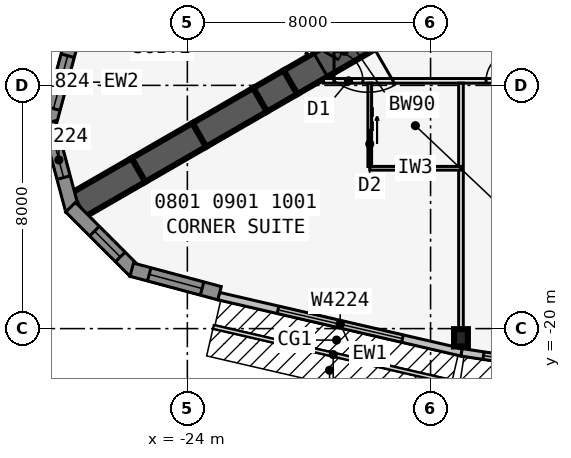
"""IFC4 building model, lengths in metres.
Left out: names, types, materials, properties, quantities, classifications, styles, units other than length and angle.
Written with IfcOpenShell. Run it as: python <this file> out.ifc"""

import sys

from ifc_helpers import new_model, si_unit, direction, frame, frame_2d, origin, origin_2d, place, context, subcontext, project, spatial, polyline, rectangle, i_section, outline, extrude, element, fill, save


model = new_model("IFC4")
c1 = context("Model", 3, precision=1e-05, world=origin(), true_north=direction((0.0, 1.0)))
c2 = subcontext(c1, "Body", "Model", "MODEL_VIEW")
j1 = project(units=[si_unit("LENGTHUNIT", "METRE"), si_unit("PLANEANGLEUNIT", "RADIAN")], contexts=[c1])
p1 = place(None, origin())
s1 = spatial("IfcSite", under=j1, at=p1, CompositionType="ELEMENT")
p2 = place(p1, origin())
s2 = spatial("IfcBuilding", under=s1, at=p2, CompositionType="ELEMENT")
p3 = place(p2, frame((0.0, 0.0, 38.7)))
s3 = spatial("IfcBuildingStorey", under=s2, at=p3, CompositionType="ELEMENT", Elevation=38.7)
p4 = place(p3, frame((-16.5, -9.526, 0.0), z_axis=(0.0, 0.0, 1.0), x_axis=(-0.866031398331, -0.499989616998, 0.0)))
e1 = element("IfcWall", 1, at=p4, inside=s3, PredefinedType="SHEAR", context=c2, shape_type="SweptSolid", body=[
    extrude(rectangle(XDim=4.746, YDim=0.9, at=frame_2d((2.373, 0.0))), origin(), (0.0, 0.0, 1.0), 3.4),
])
p5 = place(p4, frame((1.8, 0.0, 0.0)))
e2 = element("IfcOpeningElement", 2, at=p5, cuts=e1, PredefinedType="OPENING", context=c2, shape_type="SweptSolid", body=[
    extrude(rectangle(XDim=1.8, YDim=2.13, at=frame_2d((0.9, 1.065))), frame((0.0, 0.46, 0.0), z_axis=(0.0, -1.0, 0.0), x_axis=(1.0, 0.0, 0.0)), (0.0, 0.0, 1.0), 0.92),
])
p6 = place(p3, frame((-20.61, -11.899, 0.0), z_axis=(0.0, 0.0, 1.0), x_axis=(-0.866009537788, -0.500027479704, 0.0)))
e3 = element("IfcWall", 3, at=p6, inside=s3, PredefinedType="SHEAR", context=c2, shape_type="SweptSolid", body=[
    extrude(rectangle(XDim=1.155, YDim=0.9, at=frame_2d((0.577, 0.0))), origin(), (0.0, 0.0, 1.0), 3.4),
])
for number, where, z_axis, x_axis in (
    (4, (-21.61, -12.477, 0.0), (0.0, 0.0, 1.0), (-0.866, -0.5, 0.0)),
    (5, (-23.61, -13.631, 0.0), (0.0, 0.0, 1.0), (-0.866, -0.5, 0.0)),
    (6, (-25.61, -14.786, 0.0), (0.0, 0.0, 1.0), (-0.866, -0.5, 0.0)),
):
    element("IfcWall", number, at=place(p3, frame(where, z_axis=z_axis, x_axis=x_axis)), inside=s3, PredefinedType="SHEAR", context=c2, shape_type="SweptSolid", body=[
        extrude(rectangle(XDim=2.309, YDim=0.9, at=frame_2d((1.155, 0.0))), origin(), (0.0, 0.0, 1.0), 3.4),
    ])
p7 = place(p3, frame((-15.0, -20.303, 0.0), z_axis=(0.0, 0.0, 1.0), x_axis=(1.0, 0.0, 0.0)))
e7 = element("IfcColumn", 7, at=p7, inside=s3, PredefinedType="COLUMN", context=c2, shape_type="SweptSolid", body=[
    extrude(i_section(OverallWidth=0.455, OverallDepth=0.569, WebThickness=0.078, FlangeThickness=0.125, at=origin_2d()), origin(), (0.0, 0.0, 1.0), 3.4),
])
p8 = place(p3, frame((-22.972, -18.931, 0.0), z_axis=(0.0, 0.0, 1.0), x_axis=(0.974279327392, -0.225343720163, 0.0)))
e8 = element("IfcWall", 8, at=p8, inside=s3, PredefinedType="STANDARD", context=c2, shape_type="SweptSolid", body=[
    extrude(rectangle(XDim=8.211, YDim=0.25, at=frame_2d((4.105, 0.0))), origin(), (0.0, 0.0, 1.0), 3.235),
])
p9 = place(p8, frame((2.006, 0.0, 0.45)))
e9 = element("IfcOpeningElement", 9, at=p9, cuts=e8, PredefinedType="OPENING", context=c2, shape_type="SweptSolid", body=[
    extrude(rectangle(XDim=4.2, YDim=2.4, at=frame_2d((2.1, 1.2))), frame((0.0, 0.135, 0.0), z_axis=(0.0, -1.0, 0.0), x_axis=(1.0, 0.0, 0.0)), (0.0, 0.0, 1.0), 0.27),
])
p10 = place(p3, frame((-14.981, -20.779, 0.0), z_axis=(0.0, 0.0, 1.0), x_axis=(0.988615403399, -0.150464561152, 0.0)))
e10 = element("IfcWall", 10, at=p10, inside=s3, PredefinedType="STANDARD", context=c2, shape_type="SweptSolid", body=[
    extrude(rectangle(XDim=5.058, YDim=0.25, at=frame_2d((2.529, 0.0))), origin(), (0.0, 0.0, 1.0), 3.235),
])
p11 = place(p10, frame((0.729, 0.0, 0.45)))
e11 = element("IfcOpeningElement", 11, at=p11, cuts=e10, PredefinedType="OPENING", context=c2, shape_type="SweptSolid", body=[
    extrude(rectangle(XDim=3.6, YDim=2.4, at=frame_2d((1.8, 1.2))), frame((0.0, 0.135, 0.0), z_axis=(0.0, -1.0, 0.0), x_axis=(1.0, 0.0, 0.0)), (0.0, 0.0, 1.0), 0.27),
])
p12 = place(p3, frame((-27.783, -10.45, 0.0), z_axis=(0.0, 0.0, 1.0), x_axis=(-0.258780998834, -0.965936019953, 0.0)))
e12 = element("IfcWall", 12, at=p12, inside=s3, PredefinedType="SOLIDWALL", context=c2, shape_type="SweptSolid", body=[
    extrude(rectangle(XDim=2.989, YDim=0.45, at=frame_2d((1.494, 0.0))), origin(), (0.0, 0.0, 1.0), 3.235),
])
p13 = place(p12, frame((0.594, 0.0, 0.45)))
e13 = element("IfcOpeningElement", 13, at=p13, cuts=e12, PredefinedType="OPENING", context=c2, shape_type="SweptSolid", body=[
    extrude(rectangle(XDim=1.8, YDim=2.4, at=frame_2d((0.9, 1.2))), frame((0.0, 0.235, 0.0), z_axis=(0.0, -1.0, 0.0), x_axis=(1.0, 0.0, 0.0)), (0.0, 0.0, 1.0), 0.47),
])
p14 = place(p3, frame((-28.556, -13.221, 0.0), z_axis=(0.0, 0.0, 1.0), x_axis=(0.258801419081, -0.965930548995, 0.0)))
e14 = element("IfcWall", 14, at=p14, inside=s3, PredefinedType="SOLIDWALL", context=c2, shape_type="SweptSolid", body=[
    extrude(outline(polyline([(2.989, 0.225), (2.929, 0.225), (2.437, 0.093), (2.402, 0.225), (0.0, 0.225), (0.0, -0.225), (2.989, -0.225), (2.989, 0.225)])), origin(), (0.0, 0.0, 1.0), 3.235),
])
p15 = place(p14, frame((0.676, 0.0, 0.45)))
e15 = element("IfcOpeningElement", 15, at=p15, cuts=e14, PredefinedType="OPENING", context=c2, shape_type="SweptSolid", body=[
    extrude(rectangle(XDim=1.2, YDim=2.4, at=frame_2d((0.6, 1.2))), frame((0.0, 0.235, 0.0), z_axis=(0.0, -1.0, 0.0), x_axis=(1.0, 0.0, 0.0)), (0.0, 0.0, 1.0), 0.47),
])
p16 = place(p3, frame((-27.841, -16.007, 0.0), z_axis=(0.0, 0.0, 1.0), x_axis=(0.707025086683, -0.707188466253, 0.0)))
e16 = element("IfcWall", 16, at=p16, inside=s3, PredefinedType="SOLIDWALL", context=c2, shape_type="SweptSolid", body=[
    extrude(outline(polyline([(2.989, 0.225), (0.586, 0.225), (0.551, 0.093), (0.059, 0.225), (0.0, 0.225), (0.0, -0.225), (2.989, -0.225), (2.989, 0.225)])), origin(), (0.0, 0.0, 1.0), 3.235),
])
p17 = place(p16, frame((1.113, 0.0, 0.45)))
e17 = element("IfcOpeningElement", 17, at=p17, cuts=e16, PredefinedType="OPENING", context=c2, shape_type="SweptSolid", body=[
    extrude(rectangle(XDim=1.2, YDim=2.4, at=frame_2d((0.6, 1.2))), frame((0.0, 0.235, 0.0), z_axis=(0.0, -1.0, 0.0), x_axis=(1.0, 0.0, 0.0)), (0.0, 0.0, 1.0), 0.47),
])
p18 = place(p3, frame((-25.829, -18.062, 0.0), z_axis=(0.0, 0.0, 1.0), x_axis=(0.965930548995, -0.258801419081, 0.0)))
e18 = element("IfcWall", 18, at=p18, inside=s3, PredefinedType="SOLIDWALL", context=c2, shape_type="SweptSolid", body=[
    extrude(rectangle(XDim=2.989, YDim=0.45, at=frame_2d((1.494, 0.0))), origin(), (0.0, 0.0, 1.0), 3.235),
])
p19 = place(p18, frame((0.594, 0.0, 0.45)))
e19 = element("IfcOpeningElement", 19, at=p19, cuts=e18, PredefinedType="OPENING", context=c2, shape_type="SweptSolid", body=[
    extrude(rectangle(XDim=1.8, YDim=2.4, at=frame_2d((0.9, 1.2))), frame((0.0, 0.235, 0.0), z_axis=(0.0, -1.0, 0.0), x_axis=(1.0, 0.0, 0.0)), (0.0, 0.0, 1.0), 0.47),
])
p20 = place(p3, frame((-19.527, -11.851, 0.0), z_axis=(0.0, 0.0, 1.0), x_axis=(1.0, 0.0, 0.0)))
e20 = element("IfcWall", 20, at=p20, inside=s3, PredefinedType="PARTITIONING", context=c2, shape_type="SweptSolid", body=[
    extrude(rectangle(XDim=39.054, YDim=0.15, at=frame_2d((19.527, 0.0))), origin(), (0.0, 0.0, 1.0), 3.235),
])
p21 = place(p20, frame((0.352, 0.0, 0.0)))
e21 = element("IfcOpeningElement", 21, at=p21, cuts=e20, PredefinedType="OPENING", context=c2, shape_type="SweptSolid", body=[
    extrude(rectangle(XDim=0.95, YDim=2.13, at=frame_2d((0.475, 1.065))), frame((0.0, 0.085, 0.0), z_axis=(0.0, -1.0, 0.0), x_axis=(1.0, 0.0, 0.0)), (0.0, 0.0, 1.0), 0.17),
])
p22 = place(p20, frame((5.352, 0.0, 0.0)))
e22 = element("IfcOpeningElement", 22, at=p22, cuts=e20, PredefinedType="OPENING", context=c2, shape_type="SweptSolid", body=[
    extrude(rectangle(XDim=0.95, YDim=2.13, at=frame_2d((0.475, 1.065))), frame((0.0, 0.085, 0.0), z_axis=(0.0, -1.0, 0.0), x_axis=(1.0, 0.0, 0.0)), (0.0, 0.0, 1.0), 0.17),
])
p23 = place(p20, frame((12.752, 0.0, 0.0)))
e23 = element("IfcOpeningElement", 23, at=p23, cuts=e20, PredefinedType="OPENING", context=c2, shape_type="SweptSolid", body=[
    extrude(rectangle(XDim=0.95, YDim=2.13, at=frame_2d((0.475, 1.065))), frame((0.0, 0.085, 0.0), z_axis=(0.0, -1.0, 0.0), x_axis=(1.0, 0.0, 0.0)), (0.0, 0.0, 1.0), 0.17),
])
p24 = place(p20, frame((21.527, 0.0, 0.0)))
e24 = element("IfcOpeningElement", 24, at=p24, cuts=e20, PredefinedType="OPENING", context=c2, shape_type="SweptSolid", body=[
    extrude(rectangle(XDim=1.0, YDim=2.13, at=frame_2d((0.5, 1.065))), frame((0.0, 0.085, 0.0), z_axis=(0.0, -1.0, 0.0), x_axis=(1.0, 0.0, 0.0)), (0.0, 0.0, 1.0), 0.17),
])
p25 = place(p20, frame((25.952, 0.0, 0.0)))
e25 = element("IfcOpeningElement", 25, at=p25, cuts=e20, PredefinedType="OPENING", context=c2, shape_type="SweptSolid", body=[
    extrude(rectangle(XDim=0.95, YDim=2.13, at=frame_2d((0.475, 1.065))), frame((0.0, 0.085, 0.0), z_axis=(0.0, -1.0, 0.0), x_axis=(1.0, 0.0, 0.0)), (0.0, 0.0, 1.0), 0.17),
])
p26 = place(p20, frame((36.546, 0.0, 0.0)))
e26 = element("IfcOpeningElement", 26, at=p26, cuts=e20, PredefinedType="OPENING", context=c2, shape_type="SweptSolid", body=[
    extrude(rectangle(XDim=0.95, YDim=2.13, at=frame_2d((0.475, 1.065))), frame((0.0, 0.085, 0.0), z_axis=(0.0, -1.0, 0.0), x_axis=(1.0, 0.0, 0.0)), (0.0, 0.0, 1.0), 0.17),
])
p27 = place(p3, frame((-15.0, -11.926, 0.0), z_axis=(0.0, 0.0, 1.0), x_axis=(0.0, -1.0, 0.0)))
e27 = element("IfcWall", 27, at=p27, inside=s3, PredefinedType="PARTITIONING", context=c2, shape_type="SweptSolid", body=[
    extrude(rectangle(XDim=8.72, YDim=0.15, at=frame_2d((4.36, 0.0))), origin(), (0.0, 0.0, 1.0), 2.389),
])
p28 = place(p3, frame((-18.0, -14.726, 0.0), z_axis=(0.0, 0.0, 1.0), x_axis=(1.0, 0.0, 0.0)))
e28 = element("IfcWall", 28, at=p28, inside=s3, PredefinedType="PLUMBINGWALL", context=c2, shape_type="SweptSolid", body=[
    extrude(rectangle(XDim=3.0, YDim=0.12, at=frame_2d((1.5, 0.0))), origin(), (0.0, 0.0, 1.0), 3.235),
])
p29 = place(p3, frame((-18.0, -11.926, 0.0), z_axis=(0.0, 0.0, 1.0), x_axis=(0.0, -1.0, 0.0)))
e29 = element("IfcWall", 29, at=p29, inside=s3, PredefinedType="PLUMBINGWALL", context=c2, shape_type="SweptSolid", body=[
    extrude(rectangle(XDim=2.74, YDim=0.12, at=frame_2d((1.37, 0.0))), origin(), (0.0, 0.0, 1.0), 3.235),
])
p30 = place(p29, frame((1.55, 0.0, 0.0)))
e30 = element("IfcOpeningElement", 30, at=p30, cuts=e29, PredefinedType="OPENING", context=c2, shape_type="SweptSolid", body=[
    extrude(rectangle(XDim=0.9, YDim=2.13, at=frame_2d((0.45, 1.065))), frame((0.0, 0.07, 0.0), z_axis=(0.0, -1.0, 0.0), x_axis=(1.0, 0.0, 0.0)), (0.0, 0.0, 1.0), 0.14),
])
p31 = place(p3, frame((-0.5, 22.836, 0.0), z_axis=(0.0, 0.0, 1.0), x_axis=(-0.500001677587, -0.866024435227, 0.0)))
e31 = element("IfcWall", 31, at=p31, inside=s3, PredefinedType="PARTITIONING", context=c2, shape_type="SweptSolid", body=[
    extrude(rectangle(XDim=39.054, YDim=0.15, at=frame_2d((19.527, 0.0))), origin(), (0.0, 0.0, 1.0), 3.235),
])
p32 = place(p31, frame((0.352, 0.0, 0.0)))
e32 = element("IfcOpeningElement", 32, at=p32, cuts=e31, PredefinedType="OPENING", context=c2, shape_type="SweptSolid", body=[
    extrude(rectangle(XDim=0.95, YDim=2.13, at=frame_2d((0.475, 1.065))), frame((0.0, 0.085, 0.0), z_axis=(0.0, -1.0, 0.0), x_axis=(1.0, 0.0, 0.0)), (0.0, 0.0, 1.0), 0.17),
])
p33 = place(p31, frame((5.952, 0.0, 0.0)))
e33 = element("IfcOpeningElement", 33, at=p33, cuts=e31, PredefinedType="OPENING", context=c2, shape_type="SweptSolid", body=[
    extrude(rectangle(XDim=0.95, YDim=2.13, at=frame_2d((0.475, 1.065))), frame((0.0, 0.085, 0.0), z_axis=(0.0, -1.0, 0.0), x_axis=(1.0, 0.0, 0.0)), (0.0, 0.0, 1.0), 0.17),
])
p34 = place(p31, frame((11.552, 0.0, 0.0)))
e34 = element("IfcOpeningElement", 34, at=p34, cuts=e31, PredefinedType="OPENING", context=c2, shape_type="SweptSolid", body=[
    extrude(rectangle(XDim=0.95, YDim=2.13, at=frame_2d((0.475, 1.065))), frame((0.0, 0.085, 0.0), z_axis=(0.0, -1.0, 0.0), x_axis=(1.0, 0.0, 0.0)), (0.0, 0.0, 1.0), 0.17),
])
p35 = place(p31, frame((21.552, 0.0, 0.0)))
e35 = element("IfcOpeningElement", 35, at=p35, cuts=e31, PredefinedType="OPENING", context=c2, shape_type="SweptSolid", body=[
    extrude(rectangle(XDim=0.95, YDim=2.13, at=frame_2d((0.475, 1.065))), frame((0.0, 0.085, 0.0), z_axis=(0.0, -1.0, 0.0), x_axis=(1.0, 0.0, 0.0)), (0.0, 0.0, 1.0), 0.17),
])
p36 = place(p31, frame((30.952, 0.0, 0.0)))
e36 = element("IfcOpeningElement", 36, at=p36, cuts=e31, PredefinedType="OPENING", context=c2, shape_type="SweptSolid", body=[
    extrude(rectangle(XDim=0.95, YDim=2.13, at=frame_2d((0.475, 1.065))), frame((0.0, 0.085, 0.0), z_axis=(0.0, -1.0, 0.0), x_axis=(1.0, 0.0, 0.0)), (0.0, 0.0, 1.0), 0.17),
])
p37 = place(p31, frame((37.752, 0.0, 0.0)))
e37 = element("IfcOpeningElement", 37, at=p37, cuts=e31, PredefinedType="OPENING", context=c2, shape_type="SweptSolid", body=[
    extrude(rectangle(XDim=0.95, YDim=2.13, at=frame_2d((0.475, 1.065))), frame((0.0, 0.085, 0.0), z_axis=(0.0, -1.0, 0.0), x_axis=(1.0, 0.0, 0.0)), (0.0, 0.0, 1.0), 0.17),
])
p38 = place(p9, origin())
e38 = element("IfcWindow", 38, at=p38, inside=s3, PartitioningType="SINGLE_PANEL", PredefinedType="WINDOW", context=c2, shape_type="SweptSolid", body=[
    extrude(rectangle(XDim=4.2, YDim=2.4, at=frame_2d((2.1, 1.2))), frame((0.0, 0.03, 0.0), z_axis=(0.0, -1.0, 0.0), x_axis=(1.0, 0.0, 0.0)), (0.0, 0.0, 1.0), 0.06),
])
fill(e9, e38)
p39 = place(p11, origin())
e39 = element("IfcWindow", 39, at=p39, inside=s3, PartitioningType="SINGLE_PANEL", PredefinedType="WINDOW", context=c2, shape_type="SweptSolid", body=[
    extrude(rectangle(XDim=3.6, YDim=2.4, at=frame_2d((1.8, 1.2))), frame((0.0, 0.03, 0.0), z_axis=(0.0, -1.0, 0.0), x_axis=(1.0, 0.0, 0.0)), (0.0, 0.0, 1.0), 0.06),
])
fill(e11, e39)
p40 = place(p13, origin())
e40 = element("IfcWindow", 40, at=p40, inside=s3, PartitioningType="SINGLE_PANEL", PredefinedType="WINDOW", context=c2, shape_type="SweptSolid", body=[
    extrude(rectangle(XDim=1.8, YDim=2.4, at=frame_2d((0.9, 1.2))), frame((0.0, 0.03, 0.0), z_axis=(0.0, -1.0, 0.0), x_axis=(1.0, 0.0, 0.0)), (0.0, 0.0, 1.0), 0.06),
])
fill(e13, e40)
p41 = place(p15, origin())
e41 = element("IfcWindow", 41, at=p41, inside=s3, PartitioningType="SINGLE_PANEL", PredefinedType="WINDOW", context=c2, shape_type="SweptSolid", body=[
    extrude(rectangle(XDim=1.2, YDim=2.4, at=frame_2d((0.6, 1.2))), frame((0.0, 0.03, 0.0), z_axis=(0.0, -1.0, 0.0), x_axis=(1.0, 0.0, 0.0)), (0.0, 0.0, 1.0), 0.06),
])
fill(e15, e41)
p42 = place(p17, origin())
e42 = element("IfcWindow", 42, at=p42, inside=s3, PartitioningType="SINGLE_PANEL", PredefinedType="WINDOW", context=c2, shape_type="SweptSolid", body=[
    extrude(rectangle(XDim=1.2, YDim=2.4, at=frame_2d((0.6, 1.2))), frame((0.0, 0.03, 0.0), z_axis=(0.0, -1.0, 0.0), x_axis=(1.0, 0.0, 0.0)), (0.0, 0.0, 1.0), 0.06),
])
fill(e17, e42)
p43 = place(p19, origin())
e43 = element("IfcWindow", 43, at=p43, inside=s3, PartitioningType="SINGLE_PANEL", PredefinedType="WINDOW", context=c2, shape_type="SweptSolid", body=[
    extrude(rectangle(XDim=1.8, YDim=2.4, at=frame_2d((0.9, 1.2))), frame((0.0, 0.03, 0.0), z_axis=(0.0, -1.0, 0.0), x_axis=(1.0, 0.0, 0.0)), (0.0, 0.0, 1.0), 0.06),
])
fill(e19, e43)
p44 = place(p30, origin())
e44 = element("IfcDoor", 44, at=p44, inside=s3, OperationType="SLIDING_TO_LEFT", PredefinedType="DOOR", context=c2, shape_type="SweptSolid", body=[
    extrude(rectangle(XDim=0.9, YDim=2.13, at=frame_2d((0.45, 1.065))), frame((0.0, 0.025, 0.0), z_axis=(0.0, -1.0, 0.0), x_axis=(1.0, 0.0, 0.0)), (0.0, 0.0, 1.0), 0.05),
])
fill(e30, e44)
p45 = place(p21, origin())
e45 = element("IfcDoor", 45, at=p45, inside=s3, OperationType="SINGLE_SWING_LEFT", PredefinedType="DOOR", context=c2, shape_type="SweptSolid", body=[
    extrude(rectangle(XDim=0.95, YDim=2.13, at=frame_2d((0.475, 1.065))), frame((0.0, 0.025, 0.0), z_axis=(0.0, -1.0, 0.0), x_axis=(1.0, 0.0, 0.0)), (0.0, 0.0, 1.0), 0.05),
])
fill(e21, e45)
p46 = place(p22, origin())
e46 = element("IfcDoor", 46, at=p46, inside=s3, OperationType="SINGLE_SWING_RIGHT", PredefinedType="DOOR", context=c2, shape_type="SweptSolid", body=[
    extrude(rectangle(XDim=0.95, YDim=2.13, at=frame_2d((0.475, 1.065))), frame((0.0, 0.025, 0.0), z_axis=(0.0, -1.0, 0.0), x_axis=(1.0, 0.0, 0.0)), (0.0, 0.0, 1.0), 0.05),
])
fill(e22, e46)
p47 = place(p5, origin())
e47 = element("IfcDoor", 47, at=p47, inside=s3, OperationType="DOUBLE_DOOR_DOUBLE_SWING", PredefinedType="DOOR", context=c2, shape_type="SweptSolid", body=[
    extrude(rectangle(XDim=1.8, YDim=2.13, at=frame_2d((0.9, 1.065))), frame((0.0, 0.025, 0.0), z_axis=(0.0, -1.0, 0.0), x_axis=(1.0, 0.0, 0.0)), (0.0, 0.0, 1.0), 0.05),
])
fill(e2, e47)
save(model, sys.argv[1])
